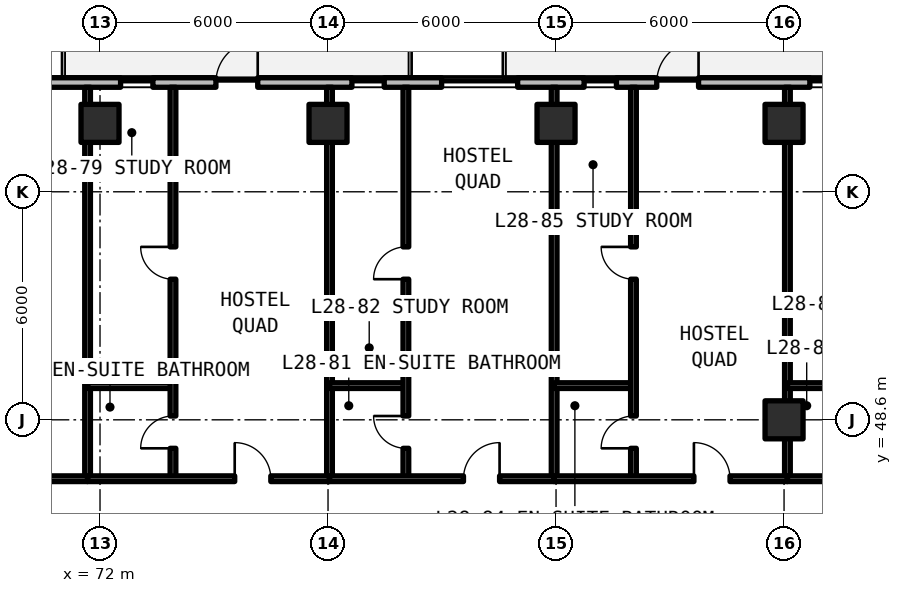
"""IFC4 building model, lengths in metres.
Left out: names, types, materials, properties, quantities, classifications, styles, units other than length and angle.
Written with IfcOpenShell. Run it as: python <this file> out.ifc"""

import sys

from ifc_helpers import new_model, si_unit, direction, frame, frame_2d, origin, origin_2d, place, context, subcontext, project, spatial, rectangle, extrude, element, fill, save


model = new_model("IFC4")
c1 = context("Model", 3, precision=1e-05, world=origin(), true_north=direction((0.0, 1.0)))
c2 = subcontext(c1, "Body", "Model", "MODEL_VIEW")
j1 = project(units=[si_unit("LENGTHUNIT", "METRE"), si_unit("PLANEANGLEUNIT", "RADIAN")], contexts=[c1])
p1 = place(None, origin())
s1 = spatial("IfcSite", under=j1, at=p1, CompositionType="ELEMENT")
p2 = place(p1, origin())
s2 = spatial("IfcBuilding", under=s1, at=p2, CompositionType="ELEMENT")
p3 = place(p2, frame((0.0, 0.0, 101.97)))
s3 = spatial("IfcBuildingStorey", under=s2, at=p3, CompositionType="ELEMENT", Elevation=101.97)
for number, where, z_axis, x_axis in (
    (1, (90.0, 48.6, 0.0), (0.0, 0.0, 1.0), (1.0, 0.0, 0.0)),
    (2, (72.0, 56.4, 0.0), (0.0, 0.0, 1.0), (1.0, 0.0, 0.0)),
    (3, (78.0, 56.4, 0.0), (0.0, 0.0, 1.0), (1.0, 0.0, 0.0)),
    (4, (84.0, 56.4, 0.0), (0.0, 0.0, 1.0), (1.0, 0.0, 0.0)),
    (5, (90.0, 56.4, 0.0), (0.0, 0.0, 1.0), (1.0, 0.0, 0.0)),
):
    element("IfcColumn", number, at=place(p3, frame(where, z_axis=z_axis, x_axis=x_axis)), inside=s3, PredefinedType="COLUMN", context=c2, shape_type="SweptSolid", body=[
        extrude(rectangle(XDim=1.0, YDim=1.0, at=origin_2d()), origin(), (0.0, 0.0, 1.0), 3.3),
    ])
p4 = place(p3, frame((96.148, 57.475, 0.0), z_axis=(0.0, 0.0, 1.0), x_axis=(-1.0, 0.0, 0.0)))
e6 = element("IfcWall", 6, at=p4, inside=s3, PredefinedType="SOLIDWALL", context=c2, shape_type="SweptSolid", body=[
    extrude(rectangle(XDim=44.023, YDim=0.25, at=frame_2d((22.012, 0.0))), origin(), (0.0, 0.0, 1.0), 3.08),
])
p5 = place(p4, frame((31.848, 0.0, 0.0)))
e7 = element("IfcOpeningElement", 7, at=p5, cuts=e6, PredefinedType="OPENING", context=c2, shape_type="SweptSolid", body=[
    extrude(rectangle(XDim=1.1, YDim=2.15, at=frame_2d((0.55, 1.075))), frame((0.0, 0.135, 0.0), z_axis=(0.0, -1.0, 0.0), x_axis=(1.0, 0.0, 0.0)), (0.0, 0.0, 1.0), 0.27),
])
p6 = place(p4, frame((19.998, 0.0, 0.0)))
e8 = element("IfcOpeningElement", 8, at=p6, cuts=e6, PredefinedType="OPENING", context=c2, shape_type="SweptSolid", body=[
    extrude(rectangle(XDim=1.1, YDim=2.15, at=frame_2d((0.55, 1.075))), frame((0.0, 0.135, 0.0), z_axis=(0.0, -1.0, 0.0), x_axis=(1.0, 0.0, 0.0)), (0.0, 0.0, 1.0), 0.27),
])
p7 = place(p4, frame((8.398, 0.0, 0.0)))
e9 = element("IfcOpeningElement", 9, at=p7, cuts=e6, PredefinedType="OPENING", context=c2, shape_type="SweptSolid", body=[
    extrude(rectangle(XDim=1.1, YDim=2.15, at=frame_2d((0.55, 1.075))), frame((0.0, 0.135, 0.0), z_axis=(0.0, -1.0, 0.0), x_axis=(1.0, 0.0, 0.0)), (0.0, 0.0, 1.0), 0.27),
])
p8 = place(p4, frame((39.277, 0.0, 0.78)))
e10 = element("IfcOpeningElement", 10, at=p8, cuts=e6, PredefinedType="OPENING", context=c2, shape_type="SweptSolid", body=[
    extrude(rectangle(XDim=2.0, YDim=1.66, at=frame_2d((1.0, 0.83))), frame((0.0, 0.135, 0.0), z_axis=(0.0, -1.0, 0.0), x_axis=(1.0, 0.0, 0.0)), (0.0, 0.0, 1.0), 0.27),
])
p9 = place(p4, frame((34.622, 0.0, 0.78)))
e11 = element("IfcOpeningElement", 11, at=p9, cuts=e6, PredefinedType="OPENING", context=c2, shape_type="SweptSolid", body=[
    extrude(rectangle(XDim=0.85, YDim=1.65, at=frame_2d((0.425, 0.825))), frame((0.0, 0.135, 0.0), z_axis=(0.0, -1.0, 0.0), x_axis=(1.0, 0.0, 0.0)), (0.0, 0.0, 1.0), 0.27),
])
p10 = place(p4, frame((26.431, 0.0, 0.78)))
e12 = element("IfcOpeningElement", 12, at=p10, cuts=e6, PredefinedType="OPENING", context=c2, shape_type="SweptSolid", body=[
    extrude(rectangle(XDim=2.0, YDim=1.66, at=frame_2d((1.0, 0.83))), frame((0.0, 0.135, 0.0), z_axis=(0.0, -1.0, 0.0), x_axis=(1.0, 0.0, 0.0)), (0.0, 0.0, 1.0), 0.27),
])
p11 = place(p4, frame((22.757, 0.0, 0.78)))
e13 = element("IfcOpeningElement", 13, at=p11, cuts=e6, PredefinedType="OPENING", context=c2, shape_type="SweptSolid", body=[
    extrude(rectangle(XDim=0.85, YDim=1.65, at=frame_2d((0.425, 0.825))), frame((0.0, 0.135, 0.0), z_axis=(0.0, -1.0, 0.0), x_axis=(1.0, 0.0, 0.0)), (0.0, 0.0, 1.0), 0.27),
])
p12 = place(p4, frame((16.669, 0.0, 0.78)))
e14 = element("IfcOpeningElement", 14, at=p12, cuts=e6, PredefinedType="OPENING", context=c2, shape_type="SweptSolid", body=[
    extrude(rectangle(XDim=0.85, YDim=1.65, at=frame_2d((0.425, 0.825))), frame((0.0, 0.135, 0.0), z_axis=(0.0, -1.0, 0.0), x_axis=(1.0, 0.0, 0.0)), (0.0, 0.0, 1.0), 0.27),
])
p13 = place(p4, frame((13.159, 0.0, 0.78)))
e15 = element("IfcOpeningElement", 15, at=p13, cuts=e6, PredefinedType="OPENING", context=c2, shape_type="SweptSolid", body=[
    extrude(rectangle(XDim=2.0, YDim=1.66, at=frame_2d((1.0, 0.83))), frame((0.0, 0.135, 0.0), z_axis=(0.0, -1.0, 0.0), x_axis=(1.0, 0.0, 0.0)), (0.0, 0.0, 1.0), 0.27),
])
p14 = place(p4, frame((10.56, 0.0, 0.78)))
e16 = element("IfcOpeningElement", 16, at=p14, cuts=e6, PredefinedType="OPENING", context=c2, shape_type="SweptSolid", body=[
    extrude(rectangle(XDim=0.85, YDim=1.65, at=frame_2d((0.425, 0.825))), frame((0.0, 0.135, 0.0), z_axis=(0.0, -1.0, 0.0), x_axis=(1.0, 0.0, 0.0)), (0.0, 0.0, 1.0), 0.27),
])
p15 = place(p4, frame((4.619, 0.0, 0.78)))
e17 = element("IfcOpeningElement", 17, at=p15, cuts=e6, PredefinedType="OPENING", context=c2, shape_type="SweptSolid", body=[
    extrude(rectangle(XDim=0.85, YDim=1.65, at=frame_2d((0.425, 0.825))), frame((0.0, 0.135, 0.0), z_axis=(0.0, -1.0, 0.0), x_axis=(1.0, 0.0, 0.0)), (0.0, 0.0, 1.0), 0.27),
])
p16 = place(p4, frame((1.109, 0.0, 0.78)))
e18 = element("IfcOpeningElement", 18, at=p16, cuts=e6, PredefinedType="OPENING", context=c2, shape_type="SweptSolid", body=[
    extrude(rectangle(XDim=2.0, YDim=1.66, at=frame_2d((1.0, 0.83))), frame((0.0, 0.135, 0.0), z_axis=(0.0, -1.0, 0.0), x_axis=(1.0, 0.0, 0.0)), (0.0, 0.0, 1.0), 0.27),
])
p17 = place(p3, frame((71.673, 47.05, 0.0), z_axis=(0.0, 0.0, 1.0), x_axis=(0.0, 1.0, 0.0)))
e19 = element("IfcWall", 19, at=p17, inside=s3, PredefinedType="SOLIDWALL", context=c2, shape_type="SweptSolid", body=[
    extrude(rectangle(XDim=10.3, YDim=0.15, at=frame_2d((5.15, 0.0))), origin(), (0.0, 0.0, 1.0), 2.35),
])
p18 = place(p3, frame((65.761, 47.05, 0.0), z_axis=(0.0, 0.0, 1.0), x_axis=(1.0, 0.0, 0.0)))
e20 = element("IfcWall", 20, at=p18, inside=s3, PredefinedType="SOLIDWALL", context=c2, shape_type="SweptSolid", body=[
    extrude(rectangle(XDim=5.911, YDim=0.15, at=frame_2d((2.956, 0.0))), origin(), (0.0, 0.0, 1.0), 2.35),
])
p19 = place(p18, frame((2.406, 0.0, 0.0)))
e21 = element("IfcOpeningElement", 21, at=p19, cuts=e20, PredefinedType="OPENING", context=c2, shape_type="SweptSolid", body=[
    extrude(rectangle(XDim=1.1, YDim=2.15, at=frame_2d((0.55, 1.075))), frame((0.0, 0.085, 0.0), z_axis=(0.0, -1.0, 0.0), x_axis=(1.0, 0.0, 0.0)), (0.0, 0.0, 1.0), 0.17),
])
p20 = place(p3, frame((78.039, 47.05, 0.0), z_axis=(0.0, 0.0, 1.0), x_axis=(0.0, 1.0, 0.0)))
e22 = element("IfcWall", 22, at=p20, inside=s3, PredefinedType="SOLIDWALL", context=c2, shape_type="SweptSolid", body=[
    extrude(rectangle(XDim=10.3, YDim=0.15, at=frame_2d((5.15, 0.0))), origin(), (0.0, 0.0, 1.0), 2.35),
])
p21 = place(p3, frame((71.673, 49.5, 0.0), z_axis=(0.0, 0.0, 1.0), x_axis=(1.0, 0.0, 0.0)))
e23 = element("IfcWall", 23, at=p21, inside=s3, PredefinedType="PARTITIONING", context=c2, shape_type="SweptSolid", body=[
    extrude(rectangle(XDim=2.247, YDim=0.15, at=frame_2d((1.124, 0.0))), origin(), (0.0, 0.0, 1.0), 2.35),
])
p22 = place(p3, frame((73.92, 47.05, 0.0), z_axis=(0.0, 0.0, 1.0), x_axis=(0.0, 1.0, 0.0)))
e24 = element("IfcWall", 24, at=p22, inside=s3, PredefinedType="PARTITIONING", context=c2, shape_type="SweptSolid", body=[
    extrude(rectangle(XDim=10.3, YDim=0.15, at=frame_2d((5.15, 0.0))), origin(), (0.0, 0.0, 1.0), 2.35),
])
p23 = place(p22, frame((0.8, 0.0, 0.0)))
e25 = element("IfcOpeningElement", 25, at=p23, cuts=e24, PredefinedType="OPENING", context=c2, shape_type="SweptSolid", body=[
    extrude(rectangle(XDim=0.85, YDim=2.1, at=frame_2d((0.425, 1.05))), frame((0.0, 0.085, 0.0), z_axis=(0.0, -1.0, 0.0), x_axis=(1.0, 0.0, 0.0)), (0.0, 0.0, 1.0), 0.17),
])
p24 = place(p22, frame((5.25, 0.0, 0.0)))
e26 = element("IfcOpeningElement", 26, at=p24, cuts=e24, PredefinedType="OPENING", context=c2, shape_type="SweptSolid", body=[
    extrude(rectangle(XDim=0.85, YDim=2.1, at=frame_2d((0.425, 1.05))), frame((0.0, 0.085, 0.0), z_axis=(0.0, -1.0, 0.0), x_axis=(1.0, 0.0, 0.0)), (0.0, 0.0, 1.0), 0.17),
])
p25 = place(p3, frame((71.673, 47.05, 0.0), z_axis=(0.0, 0.0, 1.0), x_axis=(1.0, 0.0, 0.0)))
e27 = element("IfcWall", 27, at=p25, inside=s3, PredefinedType="SOLIDWALL", context=c2, shape_type="SweptSolid", body=[
    extrude(rectangle(XDim=6.366, YDim=0.15, at=frame_2d((3.183, 0.0))), origin(), (0.0, 0.0, 1.0), 2.35),
])
p26 = place(p25, frame((3.872, 0.0, 0.0)))
e28 = element("IfcOpeningElement", 28, at=p26, cuts=e27, PredefinedType="OPENING", context=c2, shape_type="SweptSolid", body=[
    extrude(rectangle(XDim=0.95, YDim=2.15, at=frame_2d((0.475, 1.075))), frame((0.0, 0.085, 0.0), z_axis=(0.0, -1.0, 0.0), x_axis=(1.0, 0.0, 0.0)), (0.0, 0.0, 1.0), 0.17),
])
p27 = place(p3, frame((83.95, 47.05, 0.0), z_axis=(0.0, 0.0, 1.0), x_axis=(0.0, 1.0, 0.0)))
e29 = element("IfcWall", 29, at=p27, inside=s3, PredefinedType="SOLIDWALL", context=c2, shape_type="SweptSolid", body=[
    extrude(rectangle(XDim=10.3, YDim=0.15, at=frame_2d((5.15, 0.0))), origin(), (0.0, 0.0, 1.0), 2.35),
])
p28 = place(p3, frame((78.039, 49.5, 0.0), z_axis=(0.0, 0.0, 1.0), x_axis=(1.0, 0.0, 0.0)))
e30 = element("IfcWall", 30, at=p28, inside=s3, PredefinedType="PARTITIONING", context=c2, shape_type="SweptSolid", body=[
    extrude(rectangle(XDim=2.01, YDim=0.15, at=frame_2d((1.005, 0.0))), origin(), (0.0, 0.0, 1.0), 2.35),
])
p29 = place(p3, frame((80.049, 47.05, 0.0), z_axis=(0.0, 0.0, 1.0), x_axis=(0.0, 1.0, 0.0)))
e31 = element("IfcWall", 31, at=p29, inside=s3, PredefinedType="PARTITIONING", context=c2, shape_type="SweptSolid", body=[
    extrude(rectangle(XDim=10.3, YDim=0.15, at=frame_2d((5.15, 0.0))), origin(), (0.0, 0.0, 1.0), 2.35),
])
p30 = place(p29, frame((0.8, 0.0, 0.0)))
e32 = element("IfcOpeningElement", 32, at=p30, cuts=e31, PredefinedType="OPENING", context=c2, shape_type="SweptSolid", body=[
    extrude(rectangle(XDim=0.85, YDim=2.1, at=frame_2d((0.425, 1.05))), frame((0.0, 0.085, 0.0), z_axis=(0.0, -1.0, 0.0), x_axis=(1.0, 0.0, 0.0)), (0.0, 0.0, 1.0), 0.17),
])
p31 = place(p29, frame((5.25, 0.0, 0.0)))
e33 = element("IfcOpeningElement", 33, at=p31, cuts=e31, PredefinedType="OPENING", context=c2, shape_type="SweptSolid", body=[
    extrude(rectangle(XDim=0.85, YDim=2.1, at=frame_2d((0.425, 1.05))), frame((0.0, 0.085, 0.0), z_axis=(0.0, -1.0, 0.0), x_axis=(1.0, 0.0, 0.0)), (0.0, 0.0, 1.0), 0.17),
])
p32 = place(p3, frame((78.039, 47.05, 0.0), z_axis=(0.0, 0.0, 1.0), x_axis=(1.0, 0.0, 0.0)))
e34 = element("IfcWall", 34, at=p32, inside=s3, PredefinedType="SOLIDWALL", context=c2, shape_type="SweptSolid", body=[
    extrude(rectangle(XDim=5.911, YDim=0.15, at=frame_2d((2.956, 0.0))), origin(), (0.0, 0.0, 1.0), 2.35),
])
p33 = place(p32, frame((3.526, 0.0, 0.0)))
e35 = element("IfcOpeningElement", 35, at=p33, cuts=e34, PredefinedType="OPENING", context=c2, shape_type="SweptSolid", body=[
    extrude(rectangle(XDim=0.95, YDim=2.15, at=frame_2d((0.475, 1.075))), frame((0.0, 0.085, 0.0), z_axis=(0.0, -1.0, 0.0), x_axis=(1.0, 0.0, 0.0)), (0.0, 0.0, 1.0), 0.17),
])
p34 = place(p3, frame((90.089, 47.05, 0.0), z_axis=(0.0, 0.0, 1.0), x_axis=(0.0, 1.0, 0.0)))
e36 = element("IfcWall", 36, at=p34, inside=s3, PredefinedType="SOLIDWALL", context=c2, shape_type="SweptSolid", body=[
    extrude(rectangle(XDim=10.3, YDim=0.15, at=frame_2d((5.15, 0.0))), origin(), (0.0, 0.0, 1.0), 2.35),
])
p35 = place(p3, frame((83.95, 49.5, 0.0), z_axis=(0.0, 0.0, 1.0), x_axis=(1.0, 0.0, 0.0)))
e37 = element("IfcWall", 37, at=p35, inside=s3, PredefinedType="PARTITIONING", context=c2, shape_type="SweptSolid", body=[
    extrude(rectangle(XDim=2.087, YDim=0.15, at=frame_2d((1.043, 0.0))), origin(), (0.0, 0.0, 1.0), 2.35),
])
p36 = place(p3, frame((86.037, 47.05, 0.0), z_axis=(0.0, 0.0, 1.0), x_axis=(0.0, 1.0, 0.0)))
e38 = element("IfcWall", 38, at=p36, inside=s3, PredefinedType="PARTITIONING", context=c2, shape_type="SweptSolid", body=[
    extrude(rectangle(XDim=10.3, YDim=0.15, at=frame_2d((5.15, 0.0))), origin(), (0.0, 0.0, 1.0), 2.35),
])
p37 = place(p36, frame((0.8, 0.0, 0.0)))
e39 = element("IfcOpeningElement", 39, at=p37, cuts=e38, PredefinedType="OPENING", context=c2, shape_type="SweptSolid", body=[
    extrude(rectangle(XDim=0.85, YDim=2.1, at=frame_2d((0.425, 1.05))), frame((0.0, 0.085, 0.0), z_axis=(0.0, -1.0, 0.0), x_axis=(1.0, 0.0, 0.0)), (0.0, 0.0, 1.0), 0.17),
])
p38 = place(p36, frame((5.25, 0.0, 0.0)))
e40 = element("IfcOpeningElement", 40, at=p38, cuts=e38, PredefinedType="OPENING", context=c2, shape_type="SweptSolid", body=[
    extrude(rectangle(XDim=0.85, YDim=2.1, at=frame_2d((0.425, 1.05))), frame((0.0, 0.085, 0.0), z_axis=(0.0, -1.0, 0.0), x_axis=(1.0, 0.0, 0.0)), (0.0, 0.0, 1.0), 0.17),
])
p39 = place(p3, frame((83.95, 47.05, 0.0), z_axis=(0.0, 0.0, 1.0), x_axis=(1.0, 0.0, 0.0)))
e41 = element("IfcWall", 41, at=p39, inside=s3, PredefinedType="SOLIDWALL", context=c2, shape_type="SweptSolid", body=[
    extrude(rectangle(XDim=6.139, YDim=0.15, at=frame_2d((3.069, 0.0))), origin(), (0.0, 0.0, 1.0), 2.35),
])
p40 = place(p39, frame((3.678, 0.0, 0.0)))
e42 = element("IfcOpeningElement", 42, at=p40, cuts=e41, PredefinedType="OPENING", context=c2, shape_type="SweptSolid", body=[
    extrude(rectangle(XDim=0.95, YDim=2.15, at=frame_2d((0.475, 1.075))), frame((0.0, 0.085, 0.0), z_axis=(0.0, -1.0, 0.0), x_axis=(1.0, 0.0, 0.0)), (0.0, 0.0, 1.0), 0.17),
])
p41 = place(p3, frame((90.089, 49.5, 0.0), z_axis=(0.0, 0.0, 1.0), x_axis=(1.0, 0.0, 0.0)))
e43 = element("IfcWall", 43, at=p41, inside=s3, PredefinedType="PARTITIONING", context=c2, shape_type="SweptSolid", body=[
    extrude(rectangle(XDim=2.01, YDim=0.15, at=frame_2d((1.005, 0.0))), origin(), (0.0, 0.0, 1.0), 2.35),
])
p42 = place(p3, frame((90.089, 47.05, 0.0), z_axis=(0.0, 0.0, 1.0), x_axis=(1.0, 0.0, 0.0)))
e44 = element("IfcWall", 44, at=p42, inside=s3, PredefinedType="SOLIDWALL", context=c2, shape_type="SweptSolid", body=[
    extrude(rectangle(XDim=5.911, YDim=0.15, at=frame_2d((2.956, 0.0))), origin(), (0.0, 0.0, 1.0), 2.35),
])
p43 = place(p42, frame((3.525, 0.0, 0.0)))
e45 = element("IfcOpeningElement", 45, at=p43, cuts=e44, PredefinedType="OPENING", context=c2, shape_type="SweptSolid", body=[
    extrude(rectangle(XDim=0.95, YDim=2.15, at=frame_2d((0.475, 1.075))), frame((0.0, 0.085, 0.0), z_axis=(0.0, -1.0, 0.0), x_axis=(1.0, 0.0, 0.0)), (0.0, 0.0, 1.0), 0.17),
])
p44 = place(p6, frame((1.1, 0.0, 0.0), z_axis=(0.0, 0.0, 1.0), x_axis=(-1.0, 0.0, 0.0)))
e46 = element("IfcDoor", 46, at=p44, inside=s3, OperationType="SINGLE_SWING_LEFT", PredefinedType="DOOR", context=c2, shape_type="SweptSolid", body=[
    extrude(rectangle(XDim=1.1, YDim=2.15, at=frame_2d((0.55, 1.075))), frame((0.0, 0.025, 0.0), z_axis=(0.0, -1.0, 0.0), x_axis=(1.0, 0.0, 0.0)), (0.0, 0.0, 1.0), 0.05),
])
fill(e8, e46)
p45 = place(p7, frame((1.1, 0.0, 0.0), z_axis=(0.0, 0.0, 1.0), x_axis=(-1.0, 0.0, 0.0)))
e47 = element("IfcDoor", 47, at=p45, inside=s3, OperationType="SINGLE_SWING_RIGHT", PredefinedType="DOOR", context=c2, shape_type="SweptSolid", body=[
    extrude(rectangle(XDim=1.1, YDim=2.15, at=frame_2d((0.55, 1.075))), frame((0.0, 0.025, 0.0), z_axis=(0.0, -1.0, 0.0), x_axis=(1.0, 0.0, 0.0)), (0.0, 0.0, 1.0), 0.05),
])
fill(e9, e47)
p46 = place(p11, origin())
e48 = element("IfcWindow", 48, at=p46, inside=s3, PartitioningType="SINGLE_PANEL", PredefinedType="WINDOW", context=c2, shape_type="SweptSolid", body=[
    extrude(rectangle(XDim=0.85, YDim=1.65, at=frame_2d((0.425, 0.825))), frame((0.0, 0.03, 0.0), z_axis=(0.0, -1.0, 0.0), x_axis=(1.0, 0.0, 0.0)), (0.0, 0.0, 1.0), 0.06),
])
fill(e13, e48)
p47 = place(p12, origin())
e49 = element("IfcWindow", 49, at=p47, inside=s3, PartitioningType="SINGLE_PANEL", PredefinedType="WINDOW", context=c2, shape_type="SweptSolid", body=[
    extrude(rectangle(XDim=0.85, YDim=1.65, at=frame_2d((0.425, 0.825))), frame((0.0, 0.03, 0.0), z_axis=(0.0, -1.0, 0.0), x_axis=(1.0, 0.0, 0.0)), (0.0, 0.0, 1.0), 0.06),
])
fill(e14, e49)
p48 = place(p13, origin())
e50 = element("IfcWindow", 50, at=p48, inside=s3, PartitioningType="SINGLE_PANEL", PredefinedType="WINDOW", context=c2, shape_type="SweptSolid", body=[
    extrude(rectangle(XDim=2.0, YDim=1.66, at=frame_2d((1.0, 0.83))), frame((0.0, 0.03, 0.0), z_axis=(0.0, -1.0, 0.0), x_axis=(1.0, 0.0, 0.0)), (0.0, 0.0, 1.0), 0.06),
])
fill(e15, e50)
p49 = place(p14, origin())
e51 = element("IfcWindow", 51, at=p49, inside=s3, PartitioningType="SINGLE_PANEL", PredefinedType="WINDOW", context=c2, shape_type="SweptSolid", body=[
    extrude(rectangle(XDim=0.85, YDim=1.65, at=frame_2d((0.425, 0.825))), frame((0.0, 0.03, 0.0), z_axis=(0.0, -1.0, 0.0), x_axis=(1.0, 0.0, 0.0)), (0.0, 0.0, 1.0), 0.06),
])
fill(e16, e51)
p50 = place(p15, origin())
e52 = element("IfcWindow", 52, at=p50, inside=s3, PartitioningType="SINGLE_PANEL", PredefinedType="WINDOW", context=c2, shape_type="SweptSolid", body=[
    extrude(rectangle(XDim=0.85, YDim=1.65, at=frame_2d((0.425, 0.825))), frame((0.0, 0.03, 0.0), z_axis=(0.0, -1.0, 0.0), x_axis=(1.0, 0.0, 0.0)), (0.0, 0.0, 1.0), 0.06),
])
fill(e17, e52)
p51 = place(p23, origin())
e53 = element("IfcDoor", 53, at=p51, inside=s3, OperationType="SINGLE_SWING_LEFT", PredefinedType="DOOR", context=c2, shape_type="SweptSolid", body=[
    extrude(rectangle(XDim=0.85, YDim=2.1, at=frame_2d((0.425, 1.05))), frame((0.0, 0.025, 0.0), z_axis=(0.0, -1.0, 0.0), x_axis=(1.0, 0.0, 0.0)), (0.0, 0.0, 1.0), 0.05),
])
fill(e25, e53)
p52 = place(p24, origin())
e54 = element("IfcDoor", 54, at=p52, inside=s3, OperationType="SINGLE_SWING_RIGHT", PredefinedType="DOOR", context=c2, shape_type="SweptSolid", body=[
    extrude(rectangle(XDim=0.85, YDim=2.1, at=frame_2d((0.425, 1.05))), frame((0.0, 0.025, 0.0), z_axis=(0.0, -1.0, 0.0), x_axis=(1.0, 0.0, 0.0)), (0.0, 0.0, 1.0), 0.05),
])
fill(e26, e54)
p53 = place(p26, origin())
e55 = element("IfcDoor", 55, at=p53, inside=s3, OperationType="SINGLE_SWING_LEFT", PredefinedType="DOOR", context=c2, shape_type="SweptSolid", body=[
    extrude(rectangle(XDim=0.95, YDim=2.15, at=frame_2d((0.475, 1.075))), frame((0.0, 0.025, 0.0), z_axis=(0.0, -1.0, 0.0), x_axis=(1.0, 0.0, 0.0)), (0.0, 0.0, 1.0), 0.05),
])
fill(e28, e55)
p54 = place(p30, origin())
e56 = element("IfcDoor", 56, at=p54, inside=s3, OperationType="SINGLE_SWING_RIGHT", PredefinedType="DOOR", context=c2, shape_type="SweptSolid", body=[
    extrude(rectangle(XDim=0.85, YDim=2.1, at=frame_2d((0.425, 1.05))), frame((0.0, 0.025, 0.0), z_axis=(0.0, -1.0, 0.0), x_axis=(1.0, 0.0, 0.0)), (0.0, 0.0, 1.0), 0.05),
])
fill(e32, e56)
p55 = place(p31, origin())
e57 = element("IfcDoor", 57, at=p55, inside=s3, OperationType="SINGLE_SWING_LEFT", PredefinedType="DOOR", context=c2, shape_type="SweptSolid", body=[
    extrude(rectangle(XDim=0.85, YDim=2.1, at=frame_2d((0.425, 1.05))), frame((0.0, 0.025, 0.0), z_axis=(0.0, -1.0, 0.0), x_axis=(1.0, 0.0, 0.0)), (0.0, 0.0, 1.0), 0.05),
])
fill(e33, e57)
p56 = place(p33, origin())
e58 = element("IfcDoor", 58, at=p56, inside=s3, OperationType="SINGLE_SWING_RIGHT", PredefinedType="DOOR", context=c2, shape_type="SweptSolid", body=[
    extrude(rectangle(XDim=0.95, YDim=2.15, at=frame_2d((0.475, 1.075))), frame((0.0, 0.025, 0.0), z_axis=(0.0, -1.0, 0.0), x_axis=(1.0, 0.0, 0.0)), (0.0, 0.0, 1.0), 0.05),
])
fill(e35, e58)
p57 = place(p37, origin())
e59 = element("IfcDoor", 59, at=p57, inside=s3, OperationType="SINGLE_SWING_LEFT", PredefinedType="DOOR", context=c2, shape_type="SweptSolid", body=[
    extrude(rectangle(XDim=0.85, YDim=2.1, at=frame_2d((0.425, 1.05))), frame((0.0, 0.025, 0.0), z_axis=(0.0, -1.0, 0.0), x_axis=(1.0, 0.0, 0.0)), (0.0, 0.0, 1.0), 0.05),
])
fill(e39, e59)
p58 = place(p38, origin())
e60 = element("IfcDoor", 60, at=p58, inside=s3, OperationType="SINGLE_SWING_RIGHT", PredefinedType="DOOR", context=c2, shape_type="SweptSolid", body=[
    extrude(rectangle(XDim=0.85, YDim=2.1, at=frame_2d((0.425, 1.05))), frame((0.0, 0.025, 0.0), z_axis=(0.0, -1.0, 0.0), x_axis=(1.0, 0.0, 0.0)), (0.0, 0.0, 1.0), 0.05),
])
fill(e40, e60)
p59 = place(p40, origin())
e61 = element("IfcDoor", 61, at=p59, inside=s3, OperationType="SINGLE_SWING_LEFT", PredefinedType="DOOR", context=c2, shape_type="SweptSolid", body=[
    extrude(rectangle(XDim=0.95, YDim=2.15, at=frame_2d((0.475, 1.075))), frame((0.0, 0.025, 0.0), z_axis=(0.0, -1.0, 0.0), x_axis=(1.0, 0.0, 0.0)), (0.0, 0.0, 1.0), 0.05),
])
fill(e42, e61)
save(model, sys.argv[1])
